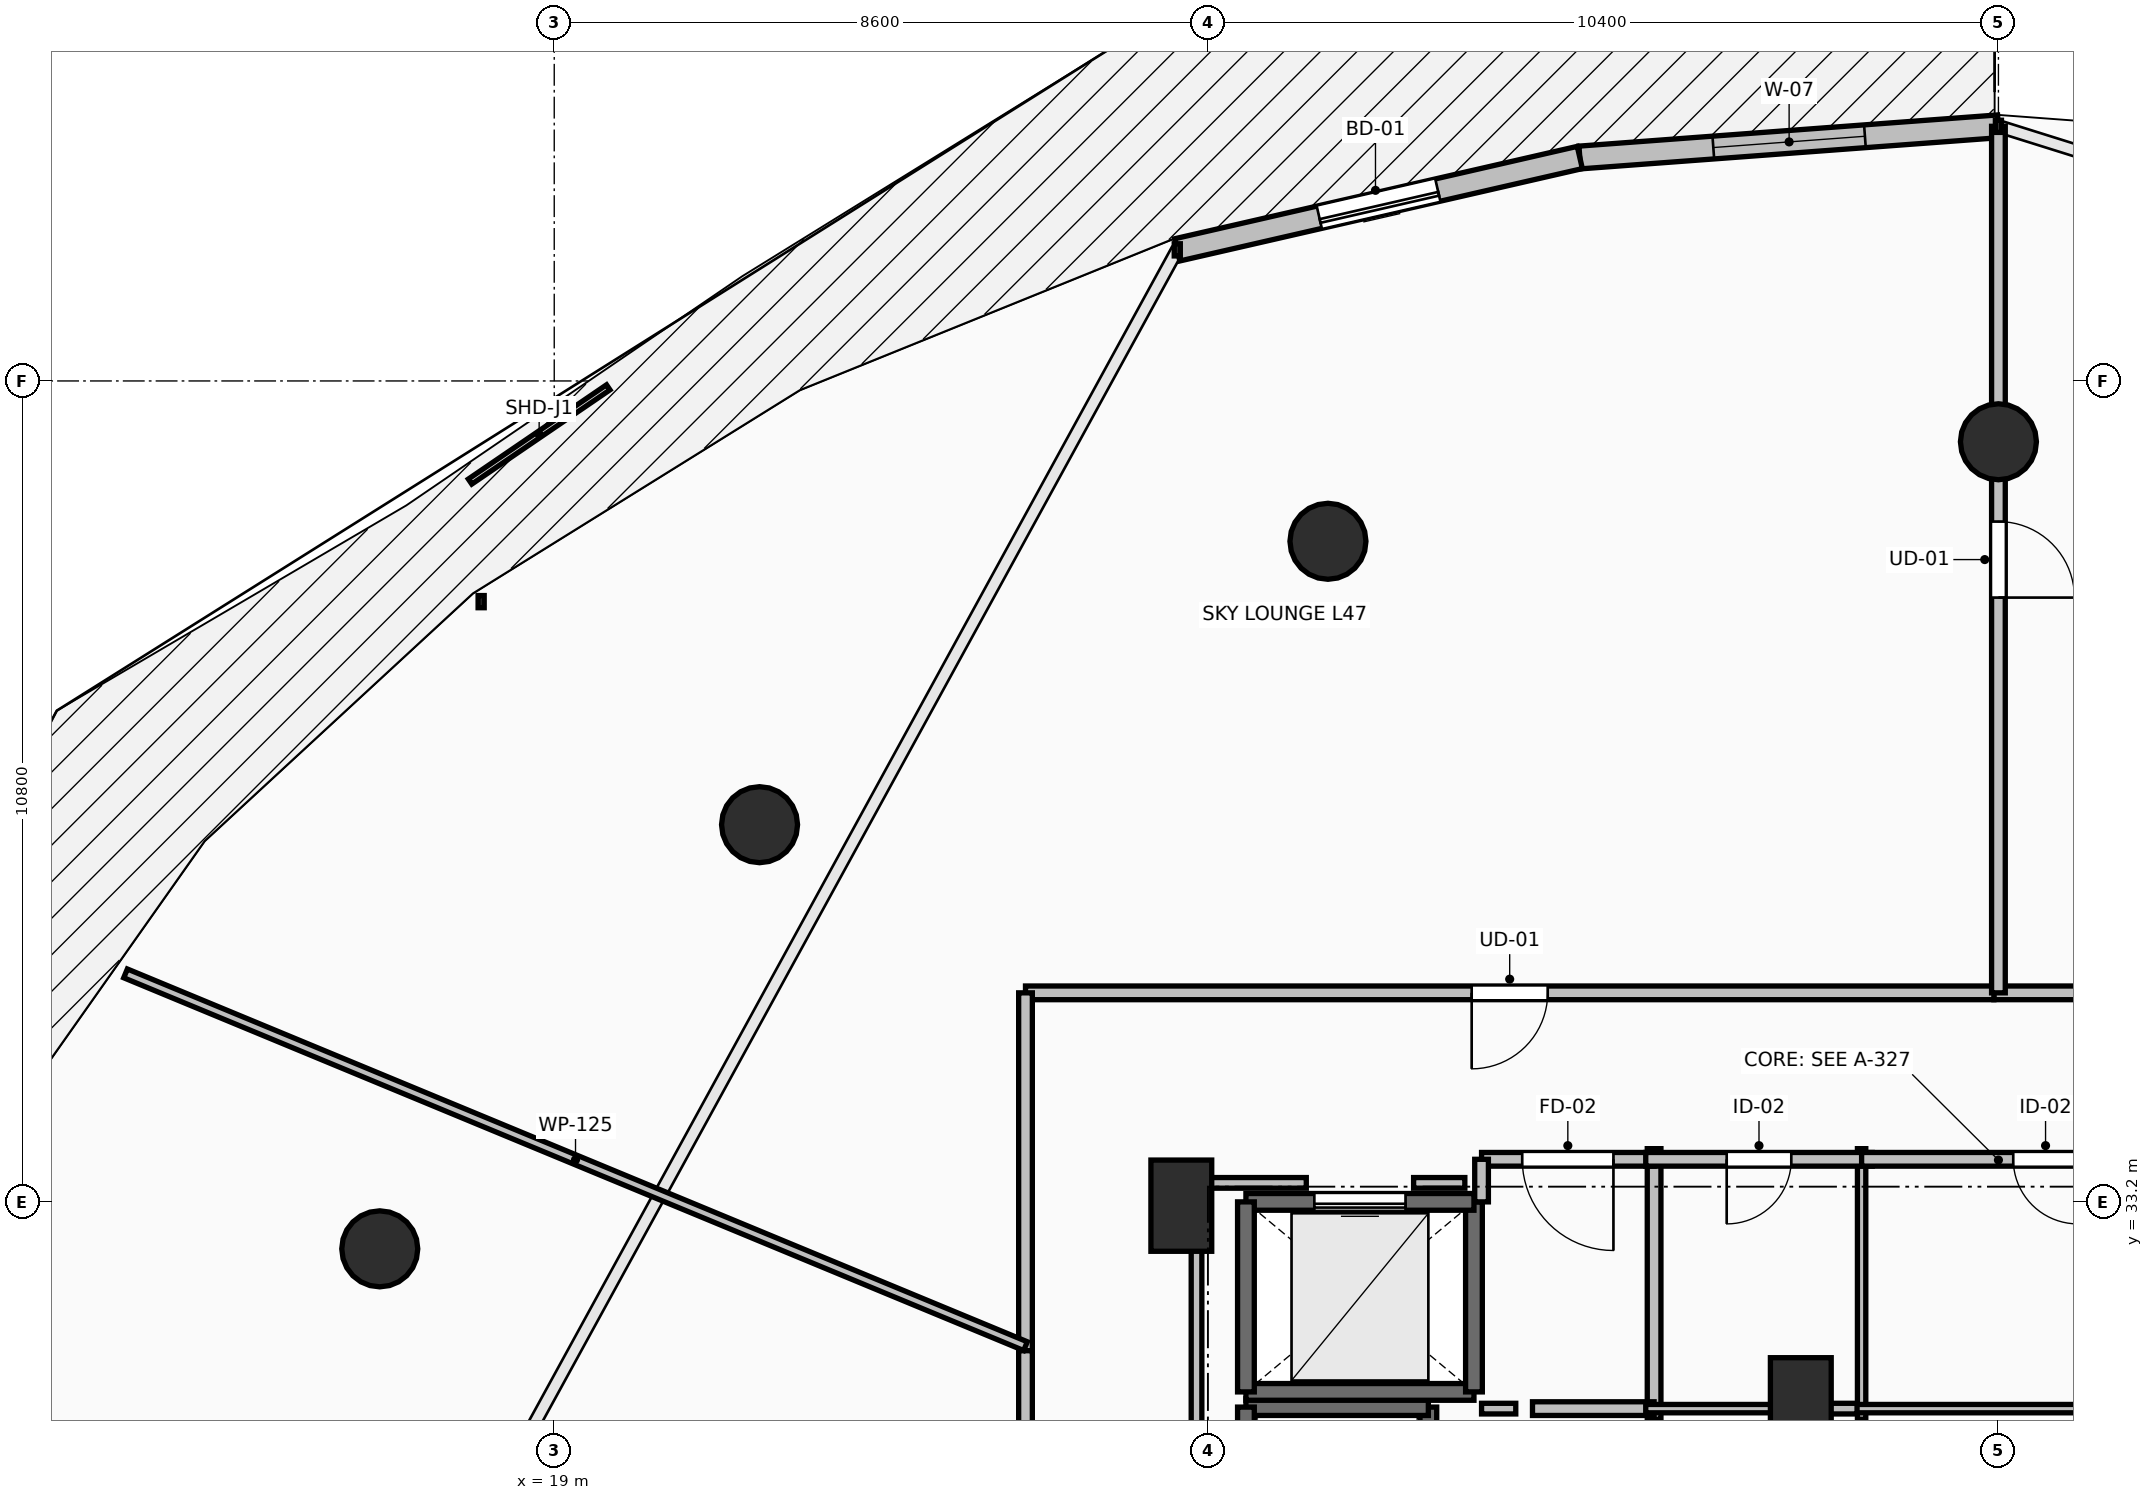
"""IFC4 building model, lengths in metres.
Left out: names, types, materials, properties, quantities, classifications, styles, units other than length and angle.
Written with IfcOpenShell. Run it as: python <this file> out.ifc"""

import sys

from ifc_helpers import new_model, si_unit, direction, frame, frame_2d, origin, origin_2d, place, context, subcontext, project, spatial, rectangle, circle, extrude, element, fill, save


model = new_model("IFC4")
c1 = context("Model", 3, precision=1e-05, world=origin(), true_north=direction((0.0, 1.0)))
c2 = subcontext(c1, "Body", "Model", "MODEL_VIEW")
j1 = project(units=[si_unit("LENGTHUNIT", "METRE"), si_unit("PLANEANGLEUNIT", "RADIAN")], contexts=[c1])
p1 = place(None, origin())
s1 = spatial("IfcSite", under=j1, at=p1, CompositionType="ELEMENT")
p2 = place(p1, origin())
s2 = spatial("IfcBuilding", under=s1, at=p2, CompositionType="ELEMENT")
p3 = place(p2, frame((0.0, 0.0, 174.6)))
s3 = spatial("IfcBuildingStorey", under=s2, at=p3, CompositionType="ELEMENT", Elevation=174.6)
for number, where, z_axis, x_axis in (
    (1, (38.0, 43.2, 0.0), (0.0, 0.0, 1.0), (0.0, 1.0, 0.0)),
    (2, (29.179, 41.891, 0.0), (0.0, 0.0, 1.0), (-0.383, 0.924, 0.0)),
    (3, (21.701, 38.162, 0.0), (0.0, 0.0, 1.0), (-0.707, 0.707, 0.0)),
    (4, (16.705, 32.582, 0.0), (0.0, 0.0, 1.0), (-0.924, 0.383, 0.0)),
):
    element("IfcColumn", number, at=place(p3, frame(where, z_axis=z_axis, x_axis=x_axis)), inside=s3, PredefinedType="COLUMN", context=c2, shape_type="SweptSolid", body=[
        extrude(circle(Radius=0.5, at=origin_2d()), origin(), (0.0, 0.0, 1.0), 4.5),
    ])
for number, where, z_axis, x_axis in (
    (5, (27.25, 33.15, 0.0), (0.0, 0.0, 1.0), (1.0, 0.0, 0.0)),
    (6, (35.4, 30.55, 0.0), (0.0, 0.0, 1.0), (1.0, 0.0, 0.0)),
):
    element("IfcColumn", number, at=place(p3, frame(where, z_axis=z_axis, x_axis=x_axis)), inside=s3, PredefinedType="PILASTER", context=c2, shape_type="SweptSolid", body=[
        extrude(rectangle(XDim=0.8, YDim=1.2, at=origin_2d()), origin(), (0.0, 0.0, 1.0), 4.5),
    ])
p4 = place(p3, frame((38.0, 47.35, 0.0), z_axis=(0.0, 0.0, 1.0), x_axis=(-0.997234968529, -0.074312970214, 0.0)))
e7 = element("IfcWall", 7, at=p4, inside=s3, PredefinedType="STANDARD", context=c2, shape_type="SweptSolid", body=[
    extrude(rectangle(XDim=5.523, YDim=0.3, at=frame_2d((2.761, 0.0))), origin(), (0.0, 0.0, 1.0), 4.24),
])
p5 = place(p4, frame((1.761, 0.0, 0.85)))
e8 = element("IfcOpeningElement", 8, at=p5, cuts=e7, PredefinedType="OPENING", context=c2, shape_type="SweptSolid", body=[
    extrude(rectangle(XDim=2.0, YDim=2.45, at=frame_2d((1.0, 1.225))), frame((0.0, 0.165, 0.0), z_axis=(0.0, -1.0, 0.0), x_axis=(1.0, 0.0, 0.0)), (0.0, 0.0, 1.0), 0.33),
])
p6 = place(p3, frame((32.493, 46.94, 0.0), z_axis=(0.0, 0.0, 1.0), x_axis=(-0.974684194578, -0.223586047954, 0.0)))
e9 = element("IfcWall", 9, at=p6, inside=s3, PredefinedType="STANDARD", context=c2, shape_type="SweptSolid", body=[
    extrude(rectangle(XDim=5.433, YDim=0.3, at=frame_2d((2.717, 0.0))), origin(), (0.0, 0.0, 1.0), 4.24),
])
p7 = place(p6, frame((1.917, 0.0, 0.0)))
e10 = element("IfcOpeningElement", 10, at=p7, cuts=e9, PredefinedType="OPENING", context=c2, shape_type="SweptSolid", body=[
    extrude(rectangle(XDim=1.6, YDim=2.3, at=frame_2d((0.8, 1.15))), frame((0.0, 0.165, 0.0), z_axis=(0.0, -1.0, 0.0), x_axis=(1.0, 0.0, 0.0)), (0.0, 0.0, 1.0), 0.33),
])
p8 = place(p3, frame((30.5, 28.0, 0.0), z_axis=(0.0, 0.0, 1.0), x_axis=(0.0, 1.0, 0.0)))
e11 = element("IfcWall", 11, at=p8, inside=s3, PredefinedType="SHEAR", context=c2, shape_type="SweptSolid", body=[
    extrude(rectangle(XDim=2.5, YDim=0.22, at=frame_2d((1.25, 0.0))), origin(), (0.0, 0.0, 1.0), 4.24),
])
p9 = place(p3, frame((30.5, 30.5, 0.0), z_axis=(0.0, 0.0, 1.0), x_axis=(-1.0, 0.0, 0.0)))
e12 = element("IfcWall", 12, at=p9, inside=s3, PredefinedType="SHEAR", context=c2, shape_type="SweptSolid", body=[
    extrude(rectangle(XDim=2.4, YDim=0.22, at=frame_2d((1.2, 0.0))), origin(), (0.0, 0.0, 1.0), 4.24),
])
p10 = place(p3, frame((28.1, 30.5, 0.0), z_axis=(0.0, 0.0, 1.0), x_axis=(0.0, -1.0, 0.0)))
e13 = element("IfcWall", 13, at=p10, inside=s3, PredefinedType="SHEAR", context=c2, shape_type="SweptSolid", body=[
    extrude(rectangle(XDim=2.5, YDim=0.22, at=frame_2d((1.25, 0.0))), origin(), (0.0, 0.0, 1.0), 4.24),
])
p11 = place(p3, frame((28.1, 30.7, 0.0), z_axis=(0.0, 0.0, 1.0), x_axis=(1.0, 0.0, 0.0)))
e14 = element("IfcWall", 14, at=p11, inside=s3, PredefinedType="SOLIDWALL", context=c2, shape_type="SweptSolid", body=[
    extrude(rectangle(XDim=3.0, YDim=0.22, at=frame_2d((1.5, 0.0))), origin(), (0.0, 0.0, 1.0), 4.24),
])
p12 = place(p3, frame((31.1, 30.7, 0.0), z_axis=(0.0, 0.0, 1.0), x_axis=(0.0, 1.0, 0.0)))
e15 = element("IfcWall", 15, at=p12, inside=s3, PredefinedType="SOLIDWALL", context=c2, shape_type="SweptSolid", body=[
    extrude(rectangle(XDim=2.5, YDim=0.22, at=frame_2d((1.25, 0.0))), origin(), (0.0, 0.0, 1.0), 4.24),
])
p13 = place(p3, frame((31.1, 33.2, 0.0), z_axis=(0.0, 0.0, 1.0), x_axis=(-1.0, 0.0, 0.0)))
e16 = element("IfcWall", 16, at=p13, inside=s3, PredefinedType="SOLIDWALL", context=c2, shape_type="SweptSolid", body=[
    extrude(rectangle(XDim=3.0, YDim=0.22, at=frame_2d((1.5, 0.0))), origin(), (0.0, 0.0, 1.0), 4.24),
])
p14 = place(p13, frame((0.9, 0.0, 0.0)))
e17 = element("IfcOpeningElement", 17, at=p14, cuts=e16, PredefinedType="OPENING", context=c2, shape_type="SweptSolid", body=[
    extrude(rectangle(XDim=1.2, YDim=2.2, at=frame_2d((0.6, 1.1))), frame((0.0, 0.125, 0.0), z_axis=(0.0, -1.0, 0.0), x_axis=(1.0, 0.0, 0.0)), (0.0, 0.0, 1.0), 0.25),
])
p15 = place(p3, frame((28.1, 33.2, 0.0), z_axis=(0.0, 0.0, 1.0), x_axis=(0.0, -1.0, 0.0)))
e18 = element("IfcWall", 18, at=p15, inside=s3, PredefinedType="SOLIDWALL", context=c2, shape_type="SweptSolid", body=[
    extrude(rectangle(XDim=2.5, YDim=0.22, at=frame_2d((1.25, 0.0))), origin(), (0.0, 0.0, 1.0), 4.24),
])
p16 = place(p3, frame((33.47, 30.34, 0.0), z_axis=(0.0, 0.0, 1.0), x_axis=(0.0, 1.0, 0.0)))
e19 = element("IfcWall", 19, at=p16, inside=s3, PredefinedType="PARTITIONING", context=c2, shape_type="SweptSolid", body=[
    extrude(rectangle(XDim=3.56, YDim=0.18, at=frame_2d((1.78, 0.0))), origin(), (0.0, 0.0, 1.0), 4.24),
])
p17 = place(p3, frame((31.87, 30.48, 0.0), z_axis=(0.0, 0.0, 1.0), x_axis=(1.0, 0.0, 0.0)))
e20 = element("IfcWall", 20, at=p17, inside=s3, PredefinedType="PARTITIONING", context=c2, shape_type="SweptSolid", body=[
    extrude(rectangle(XDim=1.6, YDim=0.18, at=frame_2d((0.8, 0.0))), origin(), (0.0, 0.0, 1.0), 4.24),
])
p18 = place(p3, frame((33.47, 33.76, 0.0), z_axis=(0.0, 0.0, 1.0), x_axis=(-1.0, 0.0, 0.0)))
e21 = element("IfcWall", 21, at=p18, inside=s3, PredefinedType="PARTITIONING", context=c2, shape_type="SweptSolid", body=[
    extrude(rectangle(XDim=2.27, YDim=0.18, at=frame_2d((1.135, 0.0))), origin(), (0.0, 0.0, 1.0), 4.24),
])
p19 = place(p18, frame((0.535, 0.0, 0.0)))
e22 = element("IfcOpeningElement", 22, at=p19, cuts=e21, PredefinedType="OPENING", context=c2, shape_type="SweptSolid", body=[
    extrude(rectangle(XDim=1.2, YDim=2.15, at=frame_2d((0.6, 1.075))), frame((0.0, 0.105, 0.0), z_axis=(0.0, -1.0, 0.0), x_axis=(1.0, 0.0, 0.0)), (0.0, 0.0, 1.0), 0.21),
])
p20 = place(p3, frame((31.2, 33.76, 0.0), z_axis=(0.0, 0.0, 1.0), x_axis=(0.0, -1.0, 0.0)))
e23 = element("IfcWall", 23, at=p20, inside=s3, PredefinedType="PARTITIONING", context=c2, shape_type="SweptSolid", body=[
    extrude(rectangle(XDim=0.56, YDim=0.18, at=frame_2d((0.28, 0.0))), origin(), (0.0, 0.0, 1.0), 4.24),
])
p21 = place(p3, frame((36.2, 30.34, 0.0), z_axis=(0.0, 0.0, 1.0), x_axis=(0.0, 1.0, 0.0)))
e24 = element("IfcWall", 24, at=p21, inside=s3, PredefinedType="PARTITIONING", context=c2, shape_type="SweptSolid", body=[
    extrude(rectangle(XDim=3.56, YDim=0.11, at=frame_2d((1.78, 0.0))), origin(), (0.0, 0.0, 1.0), 3.432),
])
p22 = place(p3, frame((33.36, 30.48, 0.0), z_axis=(0.0, 0.0, 1.0), x_axis=(1.0, 0.0, 0.0)))
e25 = element("IfcWall", 25, at=p22, inside=s3, PredefinedType="PARTITIONING", context=c2, shape_type="SweptSolid", body=[
    extrude(rectangle(XDim=1.81, YDim=0.11, at=frame_2d((0.905, 0.0))), origin(), (0.0, 0.0, 1.0), 4.24),
])
p23 = place(p3, frame((36.34, 33.76, 0.0), z_axis=(0.0, 0.0, 1.0), x_axis=(-1.0, 0.0, 0.0)))
e26 = element("IfcWall", 26, at=p23, inside=s3, PredefinedType="PARTITIONING", context=c2, shape_type="SweptSolid", body=[
    extrude(rectangle(XDim=2.98, YDim=0.18, at=frame_2d((1.49, 0.0))), origin(), (0.0, 0.0, 1.0), 4.24),
])
p24 = place(p23, frame((1.065, 0.0, 0.0)))
e27 = element("IfcOpeningElement", 27, at=p24, cuts=e26, PredefinedType="OPENING", context=c2, shape_type="SweptSolid", body=[
    extrude(rectangle(XDim=0.85, YDim=2.1, at=frame_2d((0.425, 1.05))), frame((0.0, 0.105, 0.0), z_axis=(0.0, -1.0, 0.0), x_axis=(1.0, 0.0, 0.0)), (0.0, 0.0, 1.0), 0.21),
])
p25 = place(p3, frame((36.11, 30.48, 0.0), z_axis=(0.0, 0.0, 1.0), x_axis=(1.0, 0.0, 0.0)))
e28 = element("IfcWall", 28, at=p25, inside=s3, PredefinedType="PARTITIONING", context=c2, shape_type="SweptSolid", body=[
    extrude(rectangle(XDim=3.21, YDim=0.11, at=frame_2d((1.605, 0.0))), origin(), (0.0, 0.0, 1.0), 3.432),
])
p26 = place(p3, frame((41.04, 33.76, 0.0), z_axis=(0.0, 0.0, 1.0), x_axis=(-1.0, 0.0, 0.0)))
e29 = element("IfcWall", 29, at=p26, inside=s3, PredefinedType="PARTITIONING", context=c2, shape_type="SweptSolid", body=[
    extrude(rectangle(XDim=4.84, YDim=0.18, at=frame_2d((2.42, 0.0))), origin(), (0.0, 0.0, 1.0), 4.24),
])
p27 = place(p26, frame((1.995, 0.0, 0.0)))
e30 = element("IfcOpeningElement", 30, at=p27, cuts=e29, PredefinedType="OPENING", context=c2, shape_type="SweptSolid", body=[
    extrude(rectangle(XDim=0.85, YDim=2.1, at=frame_2d((0.425, 1.05))), frame((0.0, 0.105, 0.0), z_axis=(0.0, -1.0, 0.0), x_axis=(1.0, 0.0, 0.0)), (0.0, 0.0, 1.0), 0.21),
])
p28 = place(p3, frame((50.8, 35.95, 0.0), z_axis=(0.0, 0.0, 1.0), x_axis=(-1.0, 0.0, 0.0)))
e31 = element("IfcWall", 31, at=p28, inside=s3, PredefinedType="PARTITIONING", context=c2, shape_type="SweptSolid", body=[
    extrude(rectangle(XDim=12.86, YDim=0.18, at=frame_2d((6.43, 0.0))), origin(), (0.0, 0.0, 1.0), 3.432),
])
p29 = place(p28, frame((5.83, 0.0, 0.0)))
e32 = element("IfcOpeningElement", 32, at=p29, cuts=e31, PredefinedType="OPENING", context=c2, shape_type="SweptSolid", body=[
    extrude(rectangle(XDim=1.2, YDim=2.15, at=frame_2d((0.6, 1.075))), frame((0.0, 0.105, 0.0), z_axis=(0.0, -1.0, 0.0), x_axis=(1.0, 0.0, 0.0)), (0.0, 0.0, 1.0), 0.21),
])
p30 = place(p3, frame((37.94, 35.95, 0.0), z_axis=(0.0, 0.0, 1.0), x_axis=(-1.0, 0.0, 0.0)))
e33 = element("IfcWall", 33, at=p30, inside=s3, PredefinedType="PARTITIONING", context=c2, shape_type="SweptSolid", body=[
    extrude(rectangle(XDim=12.74, YDim=0.18, at=frame_2d((6.37, 0.0))), origin(), (0.0, 0.0, 1.0), 3.432),
])
p31 = place(p30, frame((5.87, 0.0, 0.0)))
e34 = element("IfcOpeningElement", 34, at=p31, cuts=e33, PredefinedType="OPENING", context=c2, shape_type="SweptSolid", body=[
    extrude(rectangle(XDim=1.0, YDim=2.15, at=frame_2d((0.5, 1.075))), frame((0.0, 0.105, 0.0), z_axis=(0.0, -1.0, 0.0), x_axis=(1.0, 0.0, 0.0)), (0.0, 0.0, 1.0), 0.21),
])
p32 = place(p3, frame((25.2, 35.95, 0.0), z_axis=(0.0, 0.0, 1.0), x_axis=(0.0, -1.0, 0.0)))
e35 = element("IfcWall", 35, at=p32, inside=s3, PredefinedType="PARTITIONING", context=c2, shape_type="SweptSolid", body=[
    extrude(rectangle(XDim=4.708, YDim=0.18, at=frame_2d((2.354, 0.0))), origin(), (0.0, 0.0, 1.0), 3.432),
])
p33 = place(p3, frame((25.2, 31.242, 0.0), z_axis=(0.0, 0.0, 1.0), x_axis=(0.0, -1.0, 0.0)))
e36 = element("IfcWall", 36, at=p33, inside=s3, PredefinedType="PARTITIONING", context=c2, shape_type="SweptSolid", body=[
    extrude(rectangle(XDim=3.992, YDim=0.18, at=frame_2d((1.996, 0.0))), origin(), (0.0, 0.0, 1.0), 3.432),
])
p34 = place(p3, frame((38.0, 47.35, 0.0), z_axis=(0.0, 0.0, 1.0), x_axis=(0.0, -1.0, 0.0)))
e37 = element("IfcWall", 37, at=p34, inside=s3, PredefinedType="PARTITIONING", context=c2, shape_type="SweptSolid", body=[
    extrude(rectangle(XDim=11.4, YDim=0.18, at=frame_2d((5.7, 0.0))), origin(), (0.0, 0.0, 1.0), 3.886),
])
p35 = place(p34, frame((5.2, 0.0, 0.0)))
e38 = element("IfcOpeningElement", 38, at=p35, cuts=e37, PredefinedType="OPENING", context=c2, shape_type="SweptSolid", body=[
    extrude(rectangle(XDim=1.0, YDim=2.15, at=frame_2d((0.5, 1.075))), frame((0.0, 0.105, 0.0), z_axis=(0.0, -1.0, 0.0), x_axis=(1.0, 0.0, 0.0)), (0.0, 0.0, 1.0), 0.21),
])
p36 = place(p3, frame((13.36, 36.206, 0.0), z_axis=(0.0, 0.0, 1.0), x_axis=(0.923884253459, -0.382672034791, 0.0)))
e39 = element("IfcWall", 39, at=p36, inside=s3, PredefinedType="PARTITIONING", context=c2, shape_type="SweptSolid", body=[
    extrude(rectangle(XDim=12.815, YDim=0.125, at=frame_2d((6.408, 0.0))), origin(), (0.0, 0.0, 1.0), 3.728),
])
p37 = place(p3, frame((31.2, 30.48, 0.0), z_axis=(0.0, 0.0, 1.0), x_axis=(1.0, 0.0, 0.0)))
e40 = element("IfcWall", 40, at=p37, inside=s3, PredefinedType="PARTITIONING", context=c2, shape_type="SweptSolid", body=[
    extrude(rectangle(XDim=0.45, YDim=0.14, at=frame_2d((0.225, 0.0))), origin(), (0.0, 0.0, 1.0), 4.24),
])
p38 = place(p3, frame((35.14, 30.48, 0.0), z_axis=(0.0, 0.0, 1.0), x_axis=(1.0, 0.0, 0.0)))
e41 = element("IfcWall", 41, at=p38, inside=s3, PredefinedType="PARTITIONING", context=c2, shape_type="SweptSolid", body=[
    extrude(rectangle(XDim=1.0, YDim=0.14, at=frame_2d((0.5, 0.0))), origin(), (0.0, 0.0, 1.0), 3.432),
])
p39 = place(p3, frame((30.98, 33.45, 0.0), z_axis=(0.0, 0.0, 1.0), x_axis=(-1.0, 0.0, 0.0)))
e42 = element("IfcWall", 42, at=p39, inside=s3, PredefinedType="PARTITIONING", context=c2, shape_type="SweptSolid", body=[
    extrude(rectangle(XDim=0.674, YDim=0.14, at=frame_2d((0.337, 0.0))), origin(), (0.0, 0.0, 1.0), 4.24),
])
p40 = place(p3, frame((28.894, 33.45, 0.0), z_axis=(0.0, 0.0, 1.0), x_axis=(-1.0, 0.0, 0.0)))
e43 = element("IfcWall", 43, at=p40, inside=s3, PredefinedType="PARTITIONING", context=c2, shape_type="SweptSolid", body=[
    extrude(rectangle(XDim=1.444, YDim=0.14, at=frame_2d((0.722, 0.0))), origin(), (0.0, 0.0, 1.0), 3.432),
])
p41 = place(p3, frame((27.45, 33.45, 0.0), z_axis=(0.0, 0.0, 1.0), x_axis=(0.0, -1.0, 0.0)))
e44 = element("IfcWall", 44, at=p41, inside=s3, PredefinedType="PARTITIONING", context=c2, shape_type="SweptSolid", body=[
    extrude(rectangle(XDim=5.254, YDim=0.14, at=frame_2d((2.627, 0.0))), origin(), (0.0, 0.0, 1.0), 3.432),
])
p42 = place(p7, origin())
e45 = element("IfcDoor", 45, at=p42, inside=s3, OperationType="SLIDING_TO_LEFT", PredefinedType="DOOR", context=c2, shape_type="SweptSolid", body=[
    extrude(rectangle(XDim=1.6, YDim=2.3, at=frame_2d((0.8, 1.15))), frame((0.0, 0.025, 0.0), z_axis=(0.0, -1.0, 0.0), x_axis=(1.0, 0.0, 0.0)), (0.0, 0.0, 1.0), 0.05),
])
fill(e10, e45)
p43 = place(p5, origin())
e46 = element("IfcWindow", 46, at=p43, inside=s3, PartitioningType="SINGLE_PANEL", PredefinedType="WINDOW", context=c2, shape_type="SweptSolid", body=[
    extrude(rectangle(XDim=2.0, YDim=2.45, at=frame_2d((1.0, 1.225))), frame((0.0, 0.03, 0.0), z_axis=(0.0, -1.0, 0.0), x_axis=(1.0, 0.0, 0.0)), (0.0, 0.0, 1.0), 0.06),
])
fill(e8, e46)
p44 = place(p14, origin())
e47 = element("IfcDoor", 47, at=p44, inside=s3, OperationType="SLIDING_TO_LEFT", PredefinedType="DOOR", context=c2, shape_type="SweptSolid", body=[
    extrude(rectangle(XDim=1.2, YDim=2.2, at=frame_2d((0.6, 1.1))), frame((0.0, 0.025, 0.0), z_axis=(0.0, -1.0, 0.0), x_axis=(1.0, 0.0, 0.0)), (0.0, 0.0, 1.0), 0.05),
])
fill(e17, e47)
p45 = place(p19, origin())
e48 = element("IfcDoor", 48, at=p45, inside=s3, OperationType="SINGLE_SWING_LEFT", PredefinedType="DOOR", context=c2, shape_type="SweptSolid", body=[
    extrude(rectangle(XDim=1.2, YDim=2.15, at=frame_2d((0.6, 1.075))), frame((0.0, 0.025, 0.0), z_axis=(0.0, -1.0, 0.0), x_axis=(1.0, 0.0, 0.0)), (0.0, 0.0, 1.0), 0.05),
])
fill(e22, e48)
p46 = place(p24, origin())
e49 = element("IfcDoor", 49, at=p46, inside=s3, OperationType="SINGLE_SWING_RIGHT", PredefinedType="DOOR", context=c2, shape_type="SweptSolid", body=[
    extrude(rectangle(XDim=0.85, YDim=2.1, at=frame_2d((0.425, 1.05))), frame((0.0, 0.025, 0.0), z_axis=(0.0, -1.0, 0.0), x_axis=(1.0, 0.0, 0.0)), (0.0, 0.0, 1.0), 0.05),
])
fill(e27, e49)
p47 = place(p27, origin())
e50 = element("IfcDoor", 50, at=p47, inside=s3, OperationType="SINGLE_SWING_LEFT", PredefinedType="DOOR", context=c2, shape_type="SweptSolid", body=[
    extrude(rectangle(XDim=0.85, YDim=2.1, at=frame_2d((0.425, 1.05))), frame((0.0, 0.025, 0.0), z_axis=(0.0, -1.0, 0.0), x_axis=(1.0, 0.0, 0.0)), (0.0, 0.0, 1.0), 0.05),
])
fill(e30, e50)
p48 = place(p31, origin())
e51 = element("IfcDoor", 51, at=p48, inside=s3, OperationType="SINGLE_SWING_RIGHT", PredefinedType="DOOR", context=c2, shape_type="SweptSolid", body=[
    extrude(rectangle(XDim=1.0, YDim=2.15, at=frame_2d((0.5, 1.075))), frame((0.0, 0.025, 0.0), z_axis=(0.0, -1.0, 0.0), x_axis=(1.0, 0.0, 0.0)), (0.0, 0.0, 1.0), 0.05),
])
fill(e34, e51)
p49 = place(p35, origin())
e52 = element("IfcDoor", 52, at=p49, inside=s3, OperationType="SINGLE_SWING_RIGHT", PredefinedType="DOOR", context=c2, shape_type="SweptSolid", body=[
    extrude(rectangle(XDim=1.0, YDim=2.15, at=frame_2d((0.5, 1.075))), frame((0.0, 0.025, 0.0), z_axis=(0.0, -1.0, 0.0), x_axis=(1.0, 0.0, 0.0)), (0.0, 0.0, 1.0), 0.05),
])
fill(e38, e52)
save(model, sys.argv[1])
